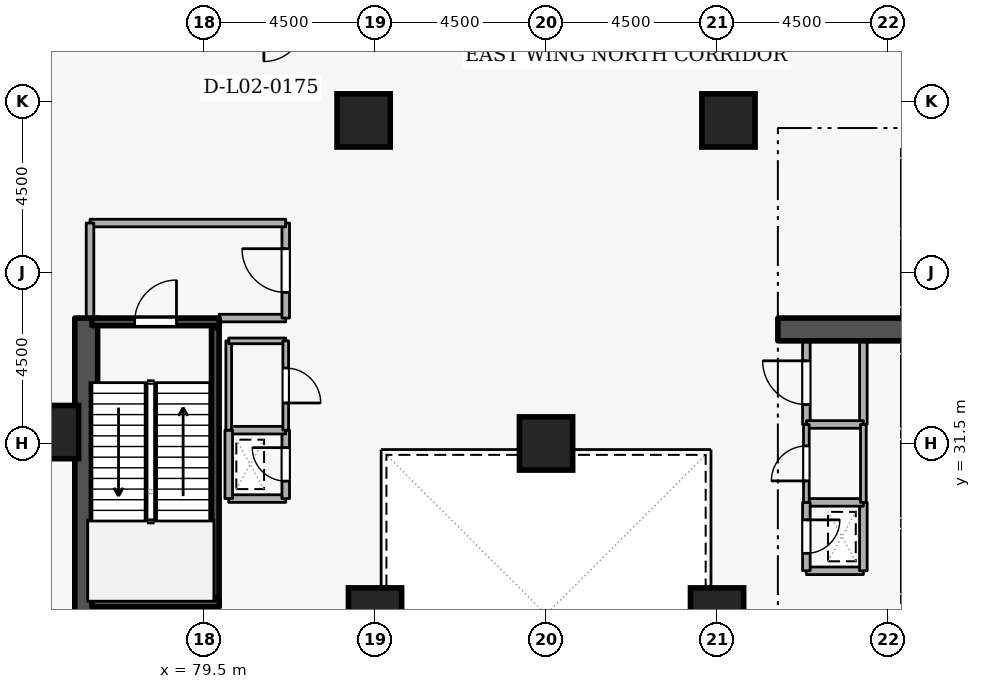
"""IFC4 building model, lengths in metres.
Left out: names, types, materials, properties, quantities, classifications, styles, units other than length and angle.
Written with IfcOpenShell. Run it as: python <this file> out.ifc"""

import sys

from ifc_helpers import new_model, si_unit, direction, frame, frame_2d, origin, origin_2d, place, context, subcontext, project, spatial, rectangle, extrude, element, fill, save


model = new_model("IFC4")
c1 = context("Model", 3, precision=1e-05, world=origin(), true_north=direction((0.0, 1.0)))
c2 = subcontext(c1, "Body", "Model", "MODEL_VIEW")
j1 = project(units=[si_unit("LENGTHUNIT", "METRE"), si_unit("PLANEANGLEUNIT", "RADIAN")], contexts=[c1])
p1 = place(None, origin())
s1 = spatial("IfcSite", under=j1, at=p1, CompositionType="ELEMENT")
p2 = place(p1, origin())
s2 = spatial("IfcBuilding", under=s1, at=p2, CompositionType="ELEMENT")
p3 = place(p2, frame((0.0, 0.0, 9.6)))
s3 = spatial("IfcBuildingStorey", under=s2, at=p3, CompositionType="ELEMENT", Elevation=9.6)
p4 = place(p3, frame((94.6, 34.5, 0.0), z_axis=(0.0, 0.0, 1.0), x_axis=(1.0, 0.0, 0.0)))
e1 = element("IfcWall", 1, at=p4, inside=s3, PredefinedType="SHEAR", context=c2, shape_type="SweptSolid", body=[
    extrude(rectangle(XDim=5.7, YDim=0.6, at=frame_2d((2.85, 0.0))), origin(), (0.0, 0.0, 1.0), 4.5),
])
p5 = place(p3, frame((76.4, 19.2, 0.0), z_axis=(0.0, 0.0, 1.0), x_axis=(0.0, 1.0, 0.0)))
e2 = element("IfcWall", 2, at=p5, inside=s3, PredefinedType="SHEAR", context=c2, shape_type="SweptSolid", body=[
    extrude(rectangle(XDim=15.6, YDim=0.6, at=frame_2d((7.8, 0.0))), origin(), (0.0, 0.0, 1.0), 4.5),
])
for number, where, z_axis, x_axis in (
    (3, (93.3, 40.0, 0.0), (0.0, 0.0, 1.0), (1.0, 0.0, 0.0)),
    (4, (83.7, 40.0, 0.0), (0.0, 0.0, 1.0), (1.0, 0.0, 0.0)),
    (5, (75.5, 31.8, 0.0), (0.0, 0.0, 1.0), (1.0, 0.0, 0.0)),
    (6, (93.0, 27.0, 0.0), (0.0, 0.0, 1.0), (1.0, 0.0, 0.0)),
    (7, (84.0, 27.0, 0.0), (0.0, 0.0, 1.0), (1.0, 0.0, 0.0)),
    (8, (88.5, 31.5, 0.0), (0.0, 0.0, 1.0), (1.0, 0.0, 0.0)),
):
    element("IfcColumn", number, at=place(p3, frame(where, z_axis=z_axis, x_axis=x_axis)), inside=s3, PredefinedType="COLUMN", context=c2, shape_type="SweptSolid", body=[
        extrude(rectangle(XDim=1.4, YDim=1.4, at=origin_2d()), origin(), (0.0, 0.0, 1.0), 4.5),
    ])
p6 = place(p3, frame((97.95, 29.22, 0.0), z_axis=(0.0, 0.0, 1.0), x_axis=(0.0, -1.0, 0.0)))
e9 = element("IfcWall", 9, at=p6, inside=s3, PredefinedType="STANDARD", context=c2, shape_type="SweptSolid", body=[
    extrude(rectangle(XDim=1.64, YDim=0.2, at=frame_2d((0.82, 0.0))), origin(), (0.0, 0.0, 1.0), 4.16),
])
p7 = place(p6, frame((0.31, 0.0, 0.0)))
e10 = element("IfcOpeningElement", 10, at=p7, cuts=e9, PredefinedType="OPENING", context=c2, shape_type="SweptSolid", body=[
    extrude(rectangle(XDim=1.02, YDim=2.06, at=frame_2d((0.51, 1.03))), frame((0.0, 0.11, 0.0), z_axis=(0.0, -1.0, 0.0), x_axis=(1.0, 0.0, 0.0)), (0.0, 0.0, 1.0), 0.22),
])
p8 = place(p3, frame((97.95, 31.57, 0.0), z_axis=(0.0, 0.0, 1.0), x_axis=(0.0, -1.0, 0.0)))
e11 = element("IfcWall", 11, at=p8, inside=s3, PredefinedType="STANDARD", context=c2, shape_type="SweptSolid", body=[
    extrude(rectangle(XDim=1.99, YDim=0.2, at=frame_2d((0.995, 0.0))), origin(), (0.0, 0.0, 1.0), 4.16),
])
p9 = place(p3, frame((97.95, 33.82, 0.0), z_axis=(0.0, 0.0, 1.0), x_axis=(0.0, -1.0, 0.0)))
e12 = element("IfcWall", 12, at=p9, inside=s3, PredefinedType="STANDARD", context=c2, shape_type="SweptSolid", body=[
    extrude(rectangle(XDim=1.89, YDim=0.2, at=frame_2d((0.945, 0.0))), origin(), (0.0, 0.0, 1.0), 4.16),
])
p10 = place(p9, frame((0.435, 0.0, 0.0)))
e13 = element("IfcOpeningElement", 13, at=p10, cuts=e12, PredefinedType="OPENING", context=c2, shape_type="SweptSolid", body=[
    extrude(rectangle(XDim=1.02, YDim=2.06, at=frame_2d((0.51, 1.03))), frame((0.0, 0.11, 0.0), z_axis=(0.0, -1.0, 0.0), x_axis=(1.0, 0.0, 0.0)), (0.0, 0.0, 1.0), 0.22),
])
p11 = place(p3, frame((97.95, 36.87, 0.0), z_axis=(0.0, 0.0, 1.0), x_axis=(0.0, -1.0, 0.0)))
e14 = element("IfcWall", 14, at=p11, inside=s3, PredefinedType="STANDARD", context=c2, shape_type="SweptSolid", body=[
    extrude(rectangle(XDim=1.74, YDim=0.2, at=frame_2d((0.87, 0.0))), origin(), (0.0, 0.0, 1.0), 4.16),
])
p12 = place(p11, frame((0.36, 0.0, 0.0)))
e15 = element("IfcOpeningElement", 15, at=p12, cuts=e14, PredefinedType="OPENING", context=c2, shape_type="SweptSolid", body=[
    extrude(rectangle(XDim=1.02, YDim=2.06, at=frame_2d((0.51, 1.03))), frame((0.0, 0.11, 0.0), z_axis=(0.0, -1.0, 0.0), x_axis=(1.0, 0.0, 0.0)), (0.0, 0.0, 1.0), 0.22),
])
p13 = place(p3, frame((97.95, 38.97, 0.0), z_axis=(0.0, 0.0, 1.0), x_axis=(0.0, -1.0, 0.0)))
e16 = element("IfcWall", 16, at=p13, inside=s3, PredefinedType="STANDARD", context=c2, shape_type="SweptSolid", body=[
    extrude(rectangle(XDim=1.79, YDim=0.2, at=frame_2d((0.895, 0.0))), origin(), (0.0, 0.0, 1.0), 4.16),
])
p14 = place(p13, frame((0.385, 0.0, 0.0)))
e17 = element("IfcOpeningElement", 17, at=p14, cuts=e16, PredefinedType="OPENING", context=c2, shape_type="SweptSolid", body=[
    extrude(rectangle(XDim=1.02, YDim=2.06, at=frame_2d((0.51, 1.03))), frame((0.0, 0.11, 0.0), z_axis=(0.0, -1.0, 0.0), x_axis=(1.0, 0.0, 0.0)), (0.0, 0.0, 1.0), 0.22),
])
p15 = place(p3, frame((76.55, 34.7, 0.0), z_axis=(0.0, 0.0, 1.0), x_axis=(1.0, 0.0, 0.0)))
e18 = element("IfcWall", 18, at=p15, inside=s3, PredefinedType="SHEAR", context=c2, shape_type="SweptSolid", body=[
    extrude(rectangle(XDim=3.35, YDim=0.2, at=frame_2d((1.675, 0.0))), origin(), (0.0, 0.0, 1.0), 4.5),
])
p16 = place(p15, frame((1.125, 0.0, 0.0)))
e19 = element("IfcOpeningElement", 19, at=p16, cuts=e18, PredefinedType="OPENING", context=c2, shape_type="SweptSolid", body=[
    extrude(rectangle(XDim=1.1, YDim=2.1, at=frame_2d((0.55, 1.05))), frame((0.0, 0.11, 0.0), z_axis=(0.0, -1.0, 0.0), x_axis=(1.0, 0.0, 0.0)), (0.0, 0.0, 1.0), 0.22),
])
p17 = place(p3, frame((79.9, 27.3, 0.0), z_axis=(0.0, 0.0, 1.0), x_axis=(-1.0, 0.0, 0.0)))
e20 = element("IfcWall", 20, at=p17, inside=s3, PredefinedType="SHEAR", context=c2, shape_type="SweptSolid", body=[
    extrude(rectangle(XDim=3.35, YDim=0.2, at=frame_2d((1.675, 0.0))), origin(), (0.0, 0.0, 1.0), 4.5),
])
p18 = place(p3, frame((79.797, 27.45, 0.0), z_axis=(0.0, 0.0, 1.0), x_axis=(0.0, 1.0, 0.0)))
e21 = element("IfcWall", 21, at=p18, inside=s3, PredefinedType="SHEAR", context=c2, shape_type="SweptSolid", body=[
    extrude(rectangle(XDim=7.1, YDim=0.2, at=frame_2d((3.55, 0.0))), origin(), (0.0, 0.0, 1.0), 4.5),
])
p19 = place(p3, frame((79.9, 34.8, 0.0), z_axis=(0.0, 0.0, 1.0), x_axis=(1.0, 0.0, 0.0)))
e22 = element("IfcWall", 22, at=p19, inside=s3, PredefinedType="STANDARD", context=c2, shape_type="SweptSolid", body=[
    extrude(rectangle(XDim=1.75, YDim=0.2, at=frame_2d((0.875, 0.0))), origin(), (0.0, 0.0, 1.0), 3.365),
])
p20 = place(p3, frame((81.65, 34.8, 0.0), z_axis=(0.0, 0.0, 1.0), x_axis=(0.0, 1.0, 0.0)))
e23 = element("IfcWall", 23, at=p20, inside=s3, PredefinedType="STANDARD", context=c2, shape_type="SweptSolid", body=[
    extrude(rectangle(XDim=2.5, YDim=0.2, at=frame_2d((1.25, 0.0))), origin(), (0.0, 0.0, 1.0), 4.16),
])
p21 = place(p20, frame((0.675, 0.0, 0.0)))
e24 = element("IfcOpeningElement", 24, at=p21, cuts=e23, PredefinedType="OPENING", context=c2, shape_type="SweptSolid", body=[
    extrude(rectangle(XDim=1.15, YDim=2.1, at=frame_2d((0.575, 1.05))), frame((0.0, 0.11, 0.0), z_axis=(0.0, -1.0, 0.0), x_axis=(1.0, 0.0, 0.0)), (0.0, 0.0, 1.0), 0.22),
])
p22 = place(p3, frame((81.65, 37.3, 0.0), z_axis=(0.0, 0.0, 1.0), x_axis=(-1.0, 0.0, 0.0)))
e25 = element("IfcWall", 25, at=p22, inside=s3, PredefinedType="STANDARD", context=c2, shape_type="SweptSolid", body=[
    extrude(rectangle(XDim=5.15, YDim=0.2, at=frame_2d((2.575, 0.0))), origin(), (0.0, 0.0, 1.0), 4.16),
])
p23 = place(p3, frame((76.5, 37.3, 0.0), z_axis=(0.0, 0.0, 1.0), x_axis=(0.0, -1.0, 0.0)))
e26 = element("IfcWall", 26, at=p23, inside=s3, PredefinedType="STANDARD", context=c2, shape_type="SweptSolid", body=[
    extrude(rectangle(XDim=2.5, YDim=0.2, at=frame_2d((1.25, 0.0))), origin(), (0.0, 0.0, 1.0), 4.16),
])
p24 = place(p3, frame((95.35, 28.15, 0.0), z_axis=(0.0, 0.0, 1.0), x_axis=(1.0, 0.0, 0.0)))
e27 = element("IfcWall", 27, at=p24, inside=s3, PredefinedType="STANDARD", context=c2, shape_type="SweptSolid", body=[
    extrude(rectangle(XDim=1.5, YDim=0.2, at=frame_2d((0.75, 0.0))), origin(), (0.0, 0.0, 1.0), 4.16),
])
p25 = place(p3, frame((96.85, 28.15, 0.0), z_axis=(0.0, 0.0, 1.0), x_axis=(0.0, 1.0, 0.0)))
e28 = element("IfcWall", 28, at=p25, inside=s3, PredefinedType="STANDARD", context=c2, shape_type="SweptSolid", body=[
    extrude(rectangle(XDim=1.8, YDim=0.2, at=frame_2d((0.9, 0.0))), origin(), (0.0, 0.0, 1.0), 4.16),
])
p26 = place(p3, frame((96.85, 29.95, 0.0), z_axis=(0.0, 0.0, 1.0), x_axis=(-1.0, 0.0, 0.0)))
e29 = element("IfcWall", 29, at=p26, inside=s3, PredefinedType="STANDARD", context=c2, shape_type="SweptSolid", body=[
    extrude(rectangle(XDim=1.5, YDim=0.2, at=frame_2d((0.75, 0.0))), origin(), (0.0, 0.0, 1.0), 4.16),
])
p27 = place(p3, frame((95.35, 29.95, 0.0), z_axis=(0.0, 0.0, 1.0), x_axis=(0.0, -1.0, 0.0)))
e30 = element("IfcWall", 30, at=p27, inside=s3, PredefinedType="STANDARD", context=c2, shape_type="SweptSolid", body=[
    extrude(rectangle(XDim=1.8, YDim=0.2, at=frame_2d((0.9, 0.0))), origin(), (0.0, 0.0, 1.0), 4.16),
])
p28 = place(p27, frame((0.46, 0.0, 0.0)))
e31 = element("IfcOpeningElement", 31, at=p28, cuts=e30, PredefinedType="OPENING", context=c2, shape_type="SweptSolid", body=[
    extrude(rectangle(XDim=0.88, YDim=2.04, at=frame_2d((0.44, 1.02))), frame((0.0, 0.11, 0.0), z_axis=(0.0, -1.0, 0.0), x_axis=(1.0, 0.0, 0.0)), (0.0, 0.0, 1.0), 0.22),
])
p29 = place(p3, frame((80.15, 30.05, 0.0), z_axis=(0.0, 0.0, 1.0), x_axis=(1.0, 0.0, 0.0)))
e32 = element("IfcWall", 32, at=p29, inside=s3, PredefinedType="STANDARD", context=c2, shape_type="SweptSolid", body=[
    extrude(rectangle(XDim=1.5, YDim=0.2, at=frame_2d((0.75, 0.0))), origin(), (0.0, 0.0, 1.0), 4.16),
])
p30 = place(p3, frame((81.65, 30.05, 0.0), z_axis=(0.0, 0.0, 1.0), x_axis=(0.0, 1.0, 0.0)))
e33 = element("IfcWall", 33, at=p30, inside=s3, PredefinedType="STANDARD", context=c2, shape_type="SweptSolid", body=[
    extrude(rectangle(XDim=1.8, YDim=0.2, at=frame_2d((0.9, 0.0))), origin(), (0.0, 0.0, 1.0), 4.16),
])
p31 = place(p30, frame((0.46, 0.0, 0.0)))
e34 = element("IfcOpeningElement", 34, at=p31, cuts=e33, PredefinedType="OPENING", context=c2, shape_type="SweptSolid", body=[
    extrude(rectangle(XDim=0.88, YDim=2.04, at=frame_2d((0.44, 1.02))), frame((0.0, 0.11, 0.0), z_axis=(0.0, -1.0, 0.0), x_axis=(1.0, 0.0, 0.0)), (0.0, 0.0, 1.0), 0.22),
])
p32 = place(p3, frame((81.65, 31.85, 0.0), z_axis=(0.0, 0.0, 1.0), x_axis=(-1.0, 0.0, 0.0)))
e35 = element("IfcWall", 35, at=p32, inside=s3, PredefinedType="STANDARD", context=c2, shape_type="SweptSolid", body=[
    extrude(rectangle(XDim=1.5, YDim=0.2, at=frame_2d((0.75, 0.0))), origin(), (0.0, 0.0, 1.0), 4.16),
])
p33 = place(p3, frame((80.15, 31.85, 0.0), z_axis=(0.0, 0.0, 1.0), x_axis=(0.0, -1.0, 0.0)))
e36 = element("IfcWall", 36, at=p33, inside=s3, PredefinedType="STANDARD", context=c2, shape_type="SweptSolid", body=[
    extrude(rectangle(XDim=1.8, YDim=0.2, at=frame_2d((0.9, 0.0))), origin(), (0.0, 0.0, 1.0), 4.16),
])
p34 = place(p3, frame((95.35, 32.0, 0.0), z_axis=(0.0, 0.0, 1.0), x_axis=(0.0, 1.0, 0.0)))
e37 = element("IfcWall", 37, at=p34, inside=s3, PredefinedType="STANDARD", context=c2, shape_type="SweptSolid", body=[
    extrude(rectangle(XDim=2.2, YDim=0.2, at=frame_2d((1.1, 0.0))), origin(), (0.0, 0.0, 1.0), 4.16),
])
p35 = place(p34, frame((0.525, 0.0, 0.0)))
e38 = element("IfcOpeningElement", 38, at=p35, cuts=e37, PredefinedType="OPENING", context=c2, shape_type="SweptSolid", body=[
    extrude(rectangle(XDim=1.15, YDim=2.1, at=frame_2d((0.575, 1.05))), frame((0.0, 0.11, 0.0), z_axis=(0.0, -1.0, 0.0), x_axis=(1.0, 0.0, 0.0)), (0.0, 0.0, 1.0), 0.22),
])
p36 = place(p3, frame((96.85, 34.2, 0.0), z_axis=(0.0, 0.0, 1.0), x_axis=(0.0, -1.0, 0.0)))
e39 = element("IfcWall", 39, at=p36, inside=s3, PredefinedType="STANDARD", context=c2, shape_type="SweptSolid", body=[
    extrude(rectangle(XDim=2.2, YDim=0.2, at=frame_2d((1.1, 0.0))), origin(), (0.0, 0.0, 1.0), 4.16),
])
p37 = place(p3, frame((96.85, 32.0, 0.0), z_axis=(0.0, 0.0, 1.0), x_axis=(-1.0, 0.0, 0.0)))
e40 = element("IfcWall", 40, at=p37, inside=s3, PredefinedType="STANDARD", context=c2, shape_type="SweptSolid", body=[
    extrude(rectangle(XDim=1.5, YDim=0.2, at=frame_2d((0.75, 0.0))), origin(), (0.0, 0.0, 1.0), 4.16),
])
p38 = place(p3, frame((95.35, 29.95, 0.0), z_axis=(0.0, 0.0, 1.0), x_axis=(0.0, 1.0, 0.0)))
e41 = element("IfcWall", 41, at=p38, inside=s3, PredefinedType="PARTITIONING", context=c2, shape_type="SweptSolid", body=[
    extrude(rectangle(XDim=2.05, YDim=0.15, at=frame_2d((1.025, 0.0))), origin(), (0.0, 0.0, 1.0), 4.16),
])
p39 = place(p38, frame((0.565, 0.0, 0.0)))
e42 = element("IfcOpeningElement", 42, at=p39, cuts=e41, PredefinedType="OPENING", context=c2, shape_type="SweptSolid", body=[
    extrude(rectangle(XDim=0.92, YDim=2.08, at=frame_2d((0.46, 1.04))), frame((0.0, 0.085, 0.0), z_axis=(0.0, -1.0, 0.0), x_axis=(1.0, 0.0, 0.0)), (0.0, 0.0, 1.0), 0.17),
])
p40 = place(p3, frame((96.85, 32.0, 0.0), z_axis=(0.0, 0.0, 1.0), x_axis=(0.0, -1.0, 0.0)))
e43 = element("IfcWall", 43, at=p40, inside=s3, PredefinedType="PARTITIONING", context=c2, shape_type="SweptSolid", body=[
    extrude(rectangle(XDim=2.05, YDim=0.15, at=frame_2d((1.025, 0.0))), origin(), (0.0, 0.0, 1.0), 4.16),
])
p41 = place(p3, frame((80.15, 31.85, 0.0), z_axis=(0.0, 0.0, 1.0), x_axis=(0.0, 1.0, 0.0)))
e44 = element("IfcWall", 44, at=p41, inside=s3, PredefinedType="PARTITIONING", context=c2, shape_type="SweptSolid", body=[
    extrude(rectangle(XDim=2.35, YDim=0.15, at=frame_2d((1.175, 0.0))), origin(), (0.0, 0.0, 1.0), 4.16),
])
p42 = place(p3, frame((80.15, 34.2, 0.0), z_axis=(0.0, 0.0, 1.0), x_axis=(1.0, 0.0, 0.0)))
e45 = element("IfcWall", 45, at=p42, inside=s3, PredefinedType="PARTITIONING", context=c2, shape_type="SweptSolid", body=[
    extrude(rectangle(XDim=1.5, YDim=0.15, at=frame_2d((0.75, 0.0))), origin(), (0.0, 0.0, 1.0), 3.365),
])
p43 = place(p3, frame((81.65, 34.2, 0.0), z_axis=(0.0, 0.0, 1.0), x_axis=(0.0, -1.0, 0.0)))
e46 = element("IfcWall", 46, at=p43, inside=s3, PredefinedType="PARTITIONING", context=c2, shape_type="SweptSolid", body=[
    extrude(rectangle(XDim=2.35, YDim=0.15, at=frame_2d((1.175, 0.0))), origin(), (0.0, 0.0, 1.0), 4.16),
])
p44 = place(p43, frame((0.715, 0.0, 0.0)))
e47 = element("IfcOpeningElement", 47, at=p44, cuts=e46, PredefinedType="OPENING", context=c2, shape_type="SweptSolid", body=[
    extrude(rectangle(XDim=0.92, YDim=2.08, at=frame_2d((0.46, 1.04))), frame((0.0, 0.085, 0.0), z_axis=(0.0, -1.0, 0.0), x_axis=(1.0, 0.0, 0.0)), (0.0, 0.0, 1.0), 0.17),
])
p45 = place(p16, origin())
e48 = element("IfcDoor", 48, at=p45, inside=s3, OperationType="SINGLE_SWING_RIGHT", PredefinedType="DOOR", context=c2, shape_type="SweptSolid", body=[
    extrude(rectangle(XDim=1.1, YDim=2.1, at=frame_2d((0.55, 1.05))), frame((0.0, 0.025, 0.0), z_axis=(0.0, -1.0, 0.0), x_axis=(1.0, 0.0, 0.0)), (0.0, 0.0, 1.0), 0.05),
])
fill(e19, e48)
p46 = place(p21, origin())
e49 = element("IfcDoor", 49, at=p46, inside=s3, OperationType="SINGLE_SWING_RIGHT", PredefinedType="DOOR", context=c2, shape_type="SweptSolid", body=[
    extrude(rectangle(XDim=1.15, YDim=2.1, at=frame_2d((0.575, 1.05))), frame((0.0, 0.025, 0.0), z_axis=(0.0, -1.0, 0.0), x_axis=(1.0, 0.0, 0.0)), (0.0, 0.0, 1.0), 0.05),
])
fill(e24, e49)
p47 = place(p28, origin())
e50 = element("IfcDoor", 50, at=p47, inside=s3, OperationType="SINGLE_SWING_LEFT", PredefinedType="DOOR", context=c2, shape_type="SweptSolid", body=[
    extrude(rectangle(XDim=0.88, YDim=2.04, at=frame_2d((0.44, 1.02))), frame((0.0, 0.025, 0.0), z_axis=(0.0, -1.0, 0.0), x_axis=(1.0, 0.0, 0.0)), (0.0, 0.0, 1.0), 0.05),
])
fill(e31, e50)
p48 = place(p31, origin())
e51 = element("IfcDoor", 51, at=p48, inside=s3, OperationType="SINGLE_SWING_RIGHT", PredefinedType="DOOR", context=c2, shape_type="SweptSolid", body=[
    extrude(rectangle(XDim=0.88, YDim=2.04, at=frame_2d((0.44, 1.02))), frame((0.0, 0.025, 0.0), z_axis=(0.0, -1.0, 0.0), x_axis=(1.0, 0.0, 0.0)), (0.0, 0.0, 1.0), 0.05),
])
fill(e34, e51)
p49 = place(p39, origin())
e52 = element("IfcDoor", 52, at=p49, inside=s3, OperationType="SINGLE_SWING_LEFT", PredefinedType="DOOR", context=c2, shape_type="SweptSolid", body=[
    extrude(rectangle(XDim=0.92, YDim=2.08, at=frame_2d((0.46, 1.04))), frame((0.0, 0.025, 0.0), z_axis=(0.0, -1.0, 0.0), x_axis=(1.0, 0.0, 0.0)), (0.0, 0.0, 1.0), 0.05),
])
fill(e42, e52)
p50 = place(p35, origin())
e53 = element("IfcDoor", 53, at=p50, inside=s3, OperationType="SINGLE_SWING_RIGHT", PredefinedType="DOOR", context=c2, shape_type="SweptSolid", body=[
    extrude(rectangle(XDim=1.15, YDim=2.1, at=frame_2d((0.575, 1.05))), frame((0.0, 0.025, 0.0), z_axis=(0.0, -1.0, 0.0), x_axis=(1.0, 0.0, 0.0)), (0.0, 0.0, 1.0), 0.05),
])
fill(e38, e53)
p51 = place(p44, origin())
e54 = element("IfcDoor", 54, at=p51, inside=s3, OperationType="SINGLE_SWING_RIGHT", PredefinedType="DOOR", context=c2, shape_type="SweptSolid", body=[
    extrude(rectangle(XDim=0.92, YDim=2.08, at=frame_2d((0.46, 1.04))), frame((0.0, 0.025, 0.0), z_axis=(0.0, -1.0, 0.0), x_axis=(1.0, 0.0, 0.0)), (0.0, 0.0, 1.0), 0.05),
])
fill(e47, e54)
save(model, sys.argv[1])
